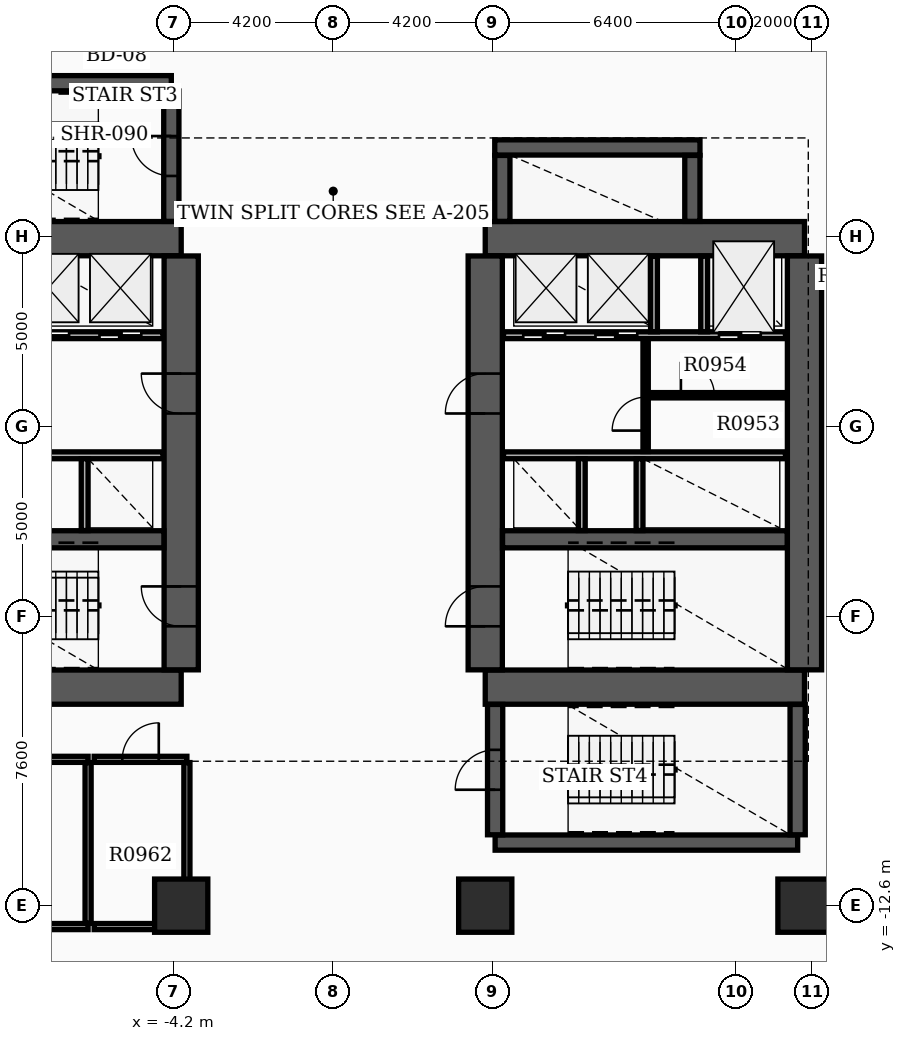
"""IFC4 building model, lengths in metres.
Left out: names, types, materials, properties, quantities, classifications, styles, units other than length and angle.
Written with IfcOpenShell. Run it as: python <this file> out.ifc"""

import sys

from ifc_helpers import new_model, si_unit, direction, frame, frame_2d, origin, origin_2d, place, context, subcontext, project, spatial, rectangle, extrude, element, fill, save


model = new_model("IFC4")
c1 = context("Model", 3, precision=1e-05, world=origin(), true_north=direction((0.0, 1.0)))
c2 = subcontext(c1, "Body", "Model", "MODEL_VIEW")
j1 = project(units=[si_unit("LENGTHUNIT", "METRE"), si_unit("PLANEANGLEUNIT", "RADIAN")], contexts=[c1])
p1 = place(None, origin())
s1 = spatial("IfcSite", under=j1, at=p1, CompositionType="ELEMENT")
p2 = place(p1, origin())
s2 = spatial("IfcBuilding", under=s1, at=p2, CompositionType="ELEMENT")
p3 = place(p2, frame((0.0, 0.0, 63.9)))
s3 = spatial("IfcBuildingStorey", under=s2, at=p3, CompositionType="ELEMENT", Elevation=63.9)
for number, where, z_axis, x_axis in (
    (1, (-12.4, -6.85, 0.0), (0.0, 0.0, 1.0), (1.0, 0.0, 0.0)),
    (2, (-12.4, 4.95, 0.0), (0.0, 0.0, 1.0), (1.0, 0.0, 0.0)),
):
    element("IfcWall", number, at=place(p3, frame(where, z_axis=z_axis, x_axis=x_axis)), inside=s3, PredefinedType="SHEAR", context=c2, shape_type="SweptSolid", body=[
        extrude(rectangle(XDim=8.4, YDim=0.9, at=frame_2d((4.2, 0.0))), origin(), (0.0, 0.0, 1.0), 3.7),
    ])
p4 = place(p3, frame((-4.0, -6.395, 0.0), z_axis=(0.0, 0.0, 1.0), x_axis=(0.0, 1.0, 0.0)))
e3 = element("IfcWall", 3, at=p4, inside=s3, PredefinedType="SHEAR", context=c2, shape_type="SweptSolid", body=[
    extrude(rectangle(XDim=10.89, YDim=0.9, at=frame_2d((5.445, 0.0))), origin(), (0.0, 0.0, 1.0), 3.7),
])
p5 = place(p4, frame((1.145, 0.0, 0.0)))
e4 = element("IfcOpeningElement", 4, at=p5, cuts=e3, PredefinedType="OPENING", context=c2, shape_type="SweptSolid", body=[
    extrude(rectangle(XDim=1.05, YDim=2.15, at=frame_2d((0.525, 1.075))), frame((0.0, 0.46, 0.0), z_axis=(0.0, -1.0, 0.0), x_axis=(1.0, 0.0, 0.0)), (0.0, 0.0, 1.0), 0.92),
])
p6 = place(p4, frame((6.745, 0.0, 0.0)))
e5 = element("IfcOpeningElement", 5, at=p6, cuts=e3, PredefinedType="OPENING", context=c2, shape_type="SweptSolid", body=[
    extrude(rectangle(XDim=1.05, YDim=2.15, at=frame_2d((0.525, 1.075))), frame((0.0, 0.46, 0.0), z_axis=(0.0, -1.0, 0.0), x_axis=(1.0, 0.0, 0.0)), (0.0, 0.0, 1.0), 0.92),
])
p7 = place(p3, frame((-11.945, -2.96, 0.0), z_axis=(0.0, 0.0, 1.0), x_axis=(1.0, 0.0, 0.0)))
e6 = element("IfcWall", 6, at=p7, inside=s3, PredefinedType="SHEAR", context=c2, shape_type="SweptSolid", body=[
    extrude(rectangle(XDim=7.49, YDim=0.45, at=frame_2d((3.745, 0.0))), origin(), (0.0, 0.0, 1.0), 3.7),
])
for number, where, z_axis, x_axis in (
    (7, (4.0, -6.85, 0.0), (0.0, 0.0, 1.0), (1.0, 0.0, 0.0)),
    (8, (4.0, 4.95, 0.0), (0.0, 0.0, 1.0), (1.0, 0.0, 0.0)),
):
    element("IfcWall", number, at=place(p3, frame(where, z_axis=z_axis, x_axis=x_axis)), inside=s3, PredefinedType="SHEAR", context=c2, shape_type="SweptSolid", body=[
        extrude(rectangle(XDim=8.4, YDim=0.9, at=frame_2d((4.2, 0.0))), origin(), (0.0, 0.0, 1.0), 3.7),
    ])
p8 = place(p3, frame((4.0, -6.395, 0.0), z_axis=(0.0, 0.0, 1.0), x_axis=(0.0, 1.0, 0.0)))
e9 = element("IfcWall", 9, at=p8, inside=s3, PredefinedType="SHEAR", context=c2, shape_type="SweptSolid", body=[
    extrude(rectangle(XDim=10.89, YDim=0.9, at=frame_2d((5.445, 0.0))), origin(), (0.0, 0.0, 1.0), 3.7),
])
p9 = place(p8, frame((1.145, 0.0, 0.0)))
e10 = element("IfcOpeningElement", 10, at=p9, cuts=e9, PredefinedType="OPENING", context=c2, shape_type="SweptSolid", body=[
    extrude(rectangle(XDim=1.05, YDim=2.15, at=frame_2d((0.525, 1.075))), frame((0.0, 0.46, 0.0), z_axis=(0.0, -1.0, 0.0), x_axis=(1.0, 0.0, 0.0)), (0.0, 0.0, 1.0), 0.92),
])
p10 = place(p8, frame((6.745, 0.0, 0.0)))
e11 = element("IfcOpeningElement", 11, at=p10, cuts=e9, PredefinedType="OPENING", context=c2, shape_type="SweptSolid", body=[
    extrude(rectangle(XDim=1.05, YDim=2.15, at=frame_2d((0.525, 1.075))), frame((0.0, 0.46, 0.0), z_axis=(0.0, -1.0, 0.0), x_axis=(1.0, 0.0, 0.0)), (0.0, 0.0, 1.0), 0.92),
])
p11 = place(p3, frame((12.4, -6.395, 0.0), z_axis=(0.0, 0.0, 1.0), x_axis=(0.0, 1.0, 0.0)))
e12 = element("IfcWall", 12, at=p11, inside=s3, PredefinedType="SHEAR", context=c2, shape_type="SweptSolid", body=[
    extrude(rectangle(XDim=10.89, YDim=0.9, at=frame_2d((5.445, 0.0))), origin(), (0.0, 0.0, 1.0), 3.7),
])
p12 = place(p3, frame((4.455, -2.96, 0.0), z_axis=(0.0, 0.0, 1.0), x_axis=(1.0, 0.0, 0.0)))
e13 = element("IfcWall", 13, at=p12, inside=s3, PredefinedType="SHEAR", context=c2, shape_type="SweptSolid", body=[
    extrude(rectangle(XDim=7.49, YDim=0.45, at=frame_2d((3.745, 0.0))), origin(), (0.0, 0.0, 1.0), 3.7),
])
p13 = place(p3, frame((-12.22, 9.04, 0.0), z_axis=(0.0, 0.0, 1.0), x_axis=(1.0, 0.0, 0.0)))
e14 = element("IfcWall", 14, at=p13, inside=s3, PredefinedType="SHEAR", context=c2, shape_type="SweptSolid", body=[
    extrude(rectangle(XDim=7.96, YDim=0.4, at=frame_2d((3.98, 0.0))), origin(), (0.0, 0.0, 1.0), 3.7),
])
p14 = place(p3, frame((-4.26, 5.405, 0.0), z_axis=(0.0, 0.0, 1.0), x_axis=(0.0, 1.0, 0.0)))
e15 = element("IfcWall", 15, at=p14, inside=s3, PredefinedType="SHEAR", context=c2, shape_type="SweptSolid", body=[
    extrude(rectangle(XDim=3.43, YDim=0.4, at=frame_2d((1.715, 0.0))), origin(), (0.0, 0.0, 1.0), 3.7),
])
p15 = place(p14, frame((1.195, 0.0, 0.0)))
e16 = element("IfcOpeningElement", 16, at=p15, cuts=e15, PredefinedType="OPENING", context=c2, shape_type="SweptSolid", body=[
    extrude(rectangle(XDim=1.05, YDim=2.15, at=frame_2d((0.525, 1.075))), frame((0.0, 0.21, 0.0), z_axis=(0.0, -1.0, 0.0), x_axis=(1.0, 0.0, 0.0)), (0.0, 0.0, 1.0), 0.42),
])
p16 = place(p3, frame((4.26, -10.94, 0.0), z_axis=(0.0, 0.0, 1.0), x_axis=(1.0, 0.0, 0.0)))
e17 = element("IfcWall", 17, at=p16, inside=s3, PredefinedType="SHEAR", context=c2, shape_type="SweptSolid", body=[
    extrude(rectangle(XDim=7.96, YDim=0.4, at=frame_2d((3.98, 0.0))), origin(), (0.0, 0.0, 1.0), 3.7),
])
p17 = place(p3, frame((4.26, -10.735, 0.0), z_axis=(0.0, 0.0, 1.0), x_axis=(0.0, 1.0, 0.0)))
e18 = element("IfcWall", 18, at=p17, inside=s3, PredefinedType="SHEAR", context=c2, shape_type="SweptSolid", body=[
    extrude(rectangle(XDim=3.43, YDim=0.4, at=frame_2d((1.715, 0.0))), origin(), (0.0, 0.0, 1.0), 3.7),
])
p18 = place(p17, frame((1.185, 0.0, 0.0)))
e19 = element("IfcOpeningElement", 19, at=p18, cuts=e18, PredefinedType="OPENING", context=c2, shape_type="SweptSolid", body=[
    extrude(rectangle(XDim=1.05, YDim=2.15, at=frame_2d((0.525, 1.075))), frame((0.0, 0.21, 0.0), z_axis=(0.0, -1.0, 0.0), x_axis=(1.0, 0.0, 0.0)), (0.0, 0.0, 1.0), 0.42),
])
p19 = place(p3, frame((12.22, -10.735, 0.0), z_axis=(0.0, 0.0, 1.0), x_axis=(0.0, 1.0, 0.0)))
e20 = element("IfcWall", 20, at=p19, inside=s3, PredefinedType="SHEAR", context=c2, shape_type="SweptSolid", body=[
    extrude(rectangle(XDim=3.43, YDim=0.4, at=frame_2d((1.715, 0.0))), origin(), (0.0, 0.0, 1.0), 3.7),
])
p20 = place(p3, frame((4.45, 5.405, 0.0), z_axis=(0.0, 0.0, 1.0), x_axis=(0.0, 1.0, 0.0)))
e21 = element("IfcWall", 21, at=p20, inside=s3, PredefinedType="SHEAR", context=c2, shape_type="SweptSolid", body=[
    extrude(rectangle(XDim=1.735, YDim=0.4, at=frame_2d((0.867, 0.0))), origin(), (0.0, 0.0, 1.0), 3.7),
])
p21 = place(p3, frame((4.25, 7.35, 0.0), z_axis=(0.0, 0.0, 1.0), x_axis=(1.0, 0.0, 0.0)))
e22 = element("IfcWall", 22, at=p21, inside=s3, PredefinedType="SHEAR", context=c2, shape_type="SweptSolid", body=[
    extrude(rectangle(XDim=5.4, YDim=0.4, at=frame_2d((2.7, 0.0))), origin(), (0.0, 0.0, 1.0), 3.7),
])
p22 = place(p3, frame((9.45, 5.405, 0.0), z_axis=(0.0, 0.0, 1.0), x_axis=(0.0, 1.0, 0.0)))
e23 = element("IfcWall", 23, at=p22, inside=s3, PredefinedType="SHEAR", context=c2, shape_type="SweptSolid", body=[
    extrude(rectangle(XDim=1.735, YDim=0.4, at=frame_2d((0.867, 0.0))), origin(), (0.0, 0.0, 1.0), 3.7),
])
for number, where, z_axis, x_axis in (
    (24, (12.4, -12.6, 0.0), (0.0, 0.0, 1.0), (1.0, 0.0, 0.0)),
    (25, (-4.0, -12.6, 0.0), (0.0, 0.0, 1.0), (1.0, 0.0, 0.0)),
    (26, (4.0, -12.6, 0.0), (0.0, 0.0, 1.0), (1.0, 0.0, 0.0)),
):
    element("IfcColumn", number, at=place(p3, frame(where, z_axis=z_axis, x_axis=x_axis)), inside=s3, PredefinedType="COLUMN", context=c2, shape_type="SweptSolid", body=[
        extrude(rectangle(XDim=1.4, YDim=1.4, at=origin_2d()), origin(), (0.0, 0.0, 1.0), 3.9),
    ])
p23 = place(p3, frame((-11.9, 2.41, 0.0), z_axis=(0.0, 0.0, 1.0), x_axis=(1.0, 0.0, 0.0)))
e27 = element("IfcWall", 27, at=p23, inside=s3, PredefinedType="SOLIDWALL", context=c2, shape_type="SweptSolid", body=[
    extrude(rectangle(XDim=7.42, YDim=0.18, at=frame_2d((3.71, 0.0))), origin(), (0.0, 0.0, 1.0), 2.9),
])
p24 = place(p23, frame((0.55, 0.0, 0.0)))
e28 = element("IfcOpeningElement", 28, at=p24, cuts=e27, PredefinedType="OPENING", context=c2, shape_type="SweptSolid", body=[
    extrude(rectangle(XDim=1.1, YDim=2.15, at=frame_2d((0.55, 1.075))), frame((0.0, 0.1, 0.0), z_axis=(0.0, -1.0, 0.0), x_axis=(1.0, 0.0, 0.0)), (0.0, 0.0, 1.0), 0.2),
])
p25 = place(p23, frame((3.85, 0.0, 0.0)))
e29 = element("IfcOpeningElement", 29, at=p25, cuts=e27, PredefinedType="OPENING", context=c2, shape_type="SweptSolid", body=[
    extrude(rectangle(XDim=1.1, YDim=2.15, at=frame_2d((0.55, 1.075))), frame((0.0, 0.1, 0.0), z_axis=(0.0, -1.0, 0.0), x_axis=(1.0, 0.0, 0.0)), (0.0, 0.0, 1.0), 0.2),
])
p26 = place(p23, frame((5.75, 0.0, 0.0)))
e30 = element("IfcOpeningElement", 30, at=p26, cuts=e27, PredefinedType="OPENING", context=c2, shape_type="SweptSolid", body=[
    extrude(rectangle(XDim=1.1, YDim=2.15, at=frame_2d((0.55, 1.075))), frame((0.0, 0.1, 0.0), z_axis=(0.0, -1.0, 0.0), x_axis=(1.0, 0.0, 0.0)), (0.0, 0.0, 1.0), 0.2),
])
p27 = place(p3, frame((4.48, 2.41, 0.0), z_axis=(0.0, 0.0, 1.0), x_axis=(1.0, 0.0, 0.0)))
e31 = element("IfcWall", 31, at=p27, inside=s3, PredefinedType="SOLIDWALL", context=c2, shape_type="SweptSolid", body=[
    extrude(rectangle(XDim=7.42, YDim=0.18, at=frame_2d((3.71, 0.0))), origin(), (0.0, 0.0, 1.0), 2.9),
])
p28 = place(p27, frame((5.67, 0.0, 0.0)))
e32 = element("IfcOpeningElement", 32, at=p28, cuts=e31, PredefinedType="OPENING", context=c2, shape_type="SweptSolid", body=[
    extrude(rectangle(XDim=1.1, YDim=2.15, at=frame_2d((0.55, 1.075))), frame((0.0, 0.1, 0.0), z_axis=(0.0, -1.0, 0.0), x_axis=(1.0, 0.0, 0.0)), (0.0, 0.0, 1.0), 0.2),
])
p29 = place(p27, frame((0.52, 0.0, 0.0)))
e33 = element("IfcOpeningElement", 33, at=p29, cuts=e31, PredefinedType="OPENING", context=c2, shape_type="SweptSolid", body=[
    extrude(rectangle(XDim=1.1, YDim=2.15, at=frame_2d((0.55, 1.075))), frame((0.0, 0.1, 0.0), z_axis=(0.0, -1.0, 0.0), x_axis=(1.0, 0.0, 0.0)), (0.0, 0.0, 1.0), 0.2),
])
p30 = place(p27, frame((2.42, 0.0, 0.0)))
e34 = element("IfcOpeningElement", 34, at=p30, cuts=e31, PredefinedType="OPENING", context=c2, shape_type="SweptSolid", body=[
    extrude(rectangle(XDim=1.1, YDim=2.15, at=frame_2d((0.55, 1.075))), frame((0.0, 0.1, 0.0), z_axis=(0.0, -1.0, 0.0), x_axis=(1.0, 0.0, 0.0)), (0.0, 0.0, 1.0), 0.2),
])
for number, where, z_axis, x_axis in (
    (35, (-11.9, -0.75, 0.0), (0.0, 0.0, 1.0), (1.0, 0.0, 0.0)),
    (36, (4.48, -0.75, 0.0), (0.0, 0.0, 1.0), (1.0, 0.0, 0.0)),
):
    element("IfcWall", number, at=place(p3, frame(where, z_axis=z_axis, x_axis=x_axis)), inside=s3, PredefinedType="SOLIDWALL", context=c2, shape_type="SweptSolid", body=[
        extrude(rectangle(XDim=7.42, YDim=0.18, at=frame_2d((3.71, 0.0))), origin(), (0.0, 0.0, 1.0), 2.9),
    ])
for number, where, z_axis, x_axis in (
    (37, (8.44, 2.5, 0.0), (0.0, 0.0, 1.0), (0.0, 1.0, 0.0)),
    (38, (9.76, 2.5, 0.0), (0.0, 0.0, 1.0), (0.0, 1.0, 0.0)),
):
    element("IfcWall", number, at=place(p3, frame(where, z_axis=z_axis, x_axis=x_axis)), inside=s3, PredefinedType="SOLIDWALL", context=c2, shape_type="SweptSolid", body=[
        extrude(rectangle(XDim=1.99, YDim=0.18, at=frame_2d((0.995, 0.0))), origin(), (0.0, 0.0, 1.0), 2.9),
    ])
for number, where, z_axis, x_axis in (
    (39, (-6.54, -2.73, 0.0), (0.0, 0.0, 1.0), (0.0, 1.0, 0.0)),
    (40, (6.54, -2.73, 0.0), (0.0, 0.0, 1.0), (0.0, 1.0, 0.0)),
    (41, (8.06, -2.73, 0.0), (0.0, 0.0, 1.0), (0.0, 1.0, 0.0)),
):
    element("IfcWall", number, at=place(p3, frame(where, z_axis=z_axis, x_axis=x_axis)), inside=s3, PredefinedType="SOLIDWALL", context=c2, shape_type="SweptSolid", body=[
        extrude(rectangle(XDim=1.89, YDim=0.18, at=frame_2d((0.945, 0.0))), origin(), (0.0, 0.0, 1.0), 2.9),
    ])
p31 = place(p3, frame((8.22, -0.65, 0.0), z_axis=(0.0, 0.0, 1.0), x_axis=(0.0, 1.0, 0.0)))
e42 = element("IfcWall", 42, at=p31, inside=s3, PredefinedType="SOLIDWALL", context=c2, shape_type="SweptSolid", body=[
    extrude(rectangle(XDim=2.96, YDim=0.14, at=frame_2d((1.48, 0.0))), origin(), (0.0, 0.0, 1.0), 2.9),
])
p32 = place(p31, frame((0.55, 0.0, 0.0)))
e43 = element("IfcOpeningElement", 43, at=p32, cuts=e42, PredefinedType="OPENING", context=c2, shape_type="SweptSolid", body=[
    extrude(rectangle(XDim=0.88, YDim=2.1, at=frame_2d((0.44, 1.05))), frame((0.0, 0.08, 0.0), z_axis=(0.0, -1.0, 0.0), x_axis=(1.0, 0.0, 0.0)), (0.0, 0.0, 1.0), 0.16),
])
p33 = place(p3, frame((8.298, 0.83, 0.0), z_axis=(0.0, 0.0, 1.0), x_axis=(1.0, 0.0, 0.0)))
e44 = element("IfcWall", 44, at=p33, inside=s3, PredefinedType="PARTITIONING", context=c2, shape_type="SweptSolid", body=[
    extrude(rectangle(XDim=3.552, YDim=0.14, at=frame_2d((1.776, 0.0))), origin(), (0.0, 0.0, 1.0), 2.9),
])
p34 = place(p33, frame((0.85, 0.0, 0.0)))
e45 = element("IfcOpeningElement", 45, at=p34, cuts=e44, PredefinedType="OPENING", context=c2, shape_type="SweptSolid", body=[
    extrude(rectangle(XDim=0.88, YDim=2.1, at=frame_2d((0.44, 1.05))), frame((0.0, 0.08, 0.0), z_axis=(0.0, -1.0, 0.0), x_axis=(1.0, 0.0, 0.0)), (0.0, 0.0, 1.0), 0.16),
])
p35 = place(p3, frame((-12.4, -13.15, 0.0), z_axis=(0.0, 0.0, 1.0), x_axis=(1.0, 0.0, 0.0)))
e46 = element("IfcWall", 46, at=p35, inside=s3, PredefinedType="PARTITIONING", context=c2, shape_type="SweptSolid", body=[
    extrude(rectangle(XDim=5.95, YDim=0.16, at=frame_2d((2.975, 0.0))), origin(), (0.0, 0.0, 1.0), 2.9),
])
p36 = place(p3, frame((-12.4, -8.75, 0.0), z_axis=(0.0, 0.0, 1.0), x_axis=(1.0, 0.0, 0.0)))
e47 = element("IfcWall", 47, at=p36, inside=s3, PredefinedType="PARTITIONING", context=c2, shape_type="SweptSolid", body=[
    extrude(rectangle(XDim=5.95, YDim=0.16, at=frame_2d((2.975, 0.0))), origin(), (0.0, 0.0, 1.0), 2.9),
])
p37 = place(p36, frame((2.495, 0.0, 0.0)))
e48 = element("IfcOpeningElement", 48, at=p37, cuts=e47, PredefinedType="OPENING", context=c2, shape_type="SweptSolid", body=[
    extrude(rectangle(XDim=0.96, YDim=2.15, at=frame_2d((0.48, 1.075))), frame((0.0, 0.09, 0.0), z_axis=(0.0, -1.0, 0.0), x_axis=(1.0, 0.0, 0.0)), (0.0, 0.0, 1.0), 0.18),
])
p38 = place(p3, frame((-6.45, -13.065, 0.0), z_axis=(0.0, 0.0, 1.0), x_axis=(0.0, 1.0, 0.0)))
e49 = element("IfcWall", 49, at=p38, inside=s3, PredefinedType="PARTITIONING", context=c2, shape_type="SweptSolid", body=[
    extrude(rectangle(XDim=4.23, YDim=0.16, at=frame_2d((2.115, 0.0))), origin(), (0.0, 0.0, 1.0), 2.9),
])
p39 = place(p3, frame((-6.29, -13.15, 0.0), z_axis=(0.0, 0.0, 1.0), x_axis=(1.0, 0.0, 0.0)))
e50 = element("IfcWall", 50, at=p39, inside=s3, PredefinedType="PARTITIONING", context=c2, shape_type="SweptSolid", body=[
    extrude(rectangle(XDim=2.44, YDim=0.16, at=frame_2d((1.22, 0.0))), origin(), (0.0, 0.0, 1.0), 2.9),
])
p40 = place(p3, frame((-6.29, -8.75, 0.0), z_axis=(0.0, 0.0, 1.0), x_axis=(1.0, 0.0, 0.0)))
e51 = element("IfcWall", 51, at=p40, inside=s3, PredefinedType="PARTITIONING", context=c2, shape_type="SweptSolid", body=[
    extrude(rectangle(XDim=2.44, YDim=0.16, at=frame_2d((1.22, 0.0))), origin(), (0.0, 0.0, 1.0), 2.9),
])
p41 = place(p40, frame((0.74, 0.0, 0.0)))
e52 = element("IfcOpeningElement", 52, at=p41, cuts=e51, PredefinedType="OPENING", context=c2, shape_type="SweptSolid", body=[
    extrude(rectangle(XDim=0.96, YDim=2.15, at=frame_2d((0.48, 1.075))), frame((0.0, 0.09, 0.0), z_axis=(0.0, -1.0, 0.0), x_axis=(1.0, 0.0, 0.0)), (0.0, 0.0, 1.0), 0.18),
])
p42 = place(p3, frame((-3.85, -13.065, 0.0), z_axis=(0.0, 0.0, 1.0), x_axis=(0.0, 1.0, 0.0)))
e53 = element("IfcWall", 53, at=p42, inside=s3, PredefinedType="PARTITIONING", context=c2, shape_type="SweptSolid", body=[
    extrude(rectangle(XDim=4.23, YDim=0.16, at=frame_2d((2.115, 0.0))), origin(), (0.0, 0.0, 1.0), 2.9),
])
p43 = place(p5, origin())
e54 = element("IfcDoor", 54, at=p43, inside=s3, OperationType="SINGLE_SWING_RIGHT", PredefinedType="DOOR", context=c2, shape_type="SweptSolid", body=[
    extrude(rectangle(XDim=1.05, YDim=2.15, at=frame_2d((0.525, 1.075))), frame((0.0, 0.025, 0.0), z_axis=(0.0, -1.0, 0.0), x_axis=(1.0, 0.0, 0.0)), (0.0, 0.0, 1.0), 0.05),
])
fill(e4, e54)
p44 = place(p9, origin())
e55 = element("IfcDoor", 55, at=p44, inside=s3, OperationType="SINGLE_SWING_LEFT", PredefinedType="DOOR", context=c2, shape_type="SweptSolid", body=[
    extrude(rectangle(XDim=1.05, YDim=2.15, at=frame_2d((0.525, 1.075))), frame((0.0, 0.025, 0.0), z_axis=(0.0, -1.0, 0.0), x_axis=(1.0, 0.0, 0.0)), (0.0, 0.0, 1.0), 0.05),
])
fill(e10, e55)
p45 = place(p6, origin())
e56 = element("IfcDoor", 56, at=p45, inside=s3, OperationType="SINGLE_SWING_RIGHT", PredefinedType="DOOR", context=c2, shape_type="SweptSolid", body=[
    extrude(rectangle(XDim=1.05, YDim=2.15, at=frame_2d((0.525, 1.075))), frame((0.0, 0.025, 0.0), z_axis=(0.0, -1.0, 0.0), x_axis=(1.0, 0.0, 0.0)), (0.0, 0.0, 1.0), 0.05),
])
fill(e5, e56)
p46 = place(p10, origin())
e57 = element("IfcDoor", 57, at=p46, inside=s3, OperationType="SINGLE_SWING_LEFT", PredefinedType="DOOR", context=c2, shape_type="SweptSolid", body=[
    extrude(rectangle(XDim=1.05, YDim=2.15, at=frame_2d((0.525, 1.075))), frame((0.0, 0.025, 0.0), z_axis=(0.0, -1.0, 0.0), x_axis=(1.0, 0.0, 0.0)), (0.0, 0.0, 1.0), 0.05),
])
fill(e11, e57)
p47 = place(p15, origin())
e58 = element("IfcDoor", 58, at=p47, inside=s3, OperationType="SINGLE_SWING_RIGHT", PredefinedType="DOOR", context=c2, shape_type="SweptSolid", body=[
    extrude(rectangle(XDim=1.05, YDim=2.15, at=frame_2d((0.525, 1.075))), frame((0.0, 0.025, 0.0), z_axis=(0.0, -1.0, 0.0), x_axis=(1.0, 0.0, 0.0)), (0.0, 0.0, 1.0), 0.05),
])
fill(e16, e58)
p48 = place(p18, origin())
e59 = element("IfcDoor", 59, at=p48, inside=s3, OperationType="SINGLE_SWING_LEFT", PredefinedType="DOOR", context=c2, shape_type="SweptSolid", body=[
    extrude(rectangle(XDim=1.05, YDim=2.15, at=frame_2d((0.525, 1.075))), frame((0.0, 0.025, 0.0), z_axis=(0.0, -1.0, 0.0), x_axis=(1.0, 0.0, 0.0)), (0.0, 0.0, 1.0), 0.05),
])
fill(e19, e59)
p49 = place(p28, origin())
e60 = element("IfcDoor", 60, at=p49, inside=s3, OperationType="DOUBLE_DOOR_SLIDING", PredefinedType="DOOR", context=c2, shape_type="SweptSolid", body=[
    extrude(rectangle(XDim=1.1, YDim=2.15, at=frame_2d((0.55, 1.075))), frame((0.0, 0.025, 0.0), z_axis=(0.0, -1.0, 0.0), x_axis=(1.0, 0.0, 0.0)), (0.0, 0.0, 1.0), 0.05),
])
fill(e32, e60)
p50 = place(p25, origin())
e61 = element("IfcDoor", 61, at=p50, inside=s3, OperationType="DOUBLE_DOOR_SLIDING", PredefinedType="DOOR", context=c2, shape_type="SweptSolid", body=[
    extrude(rectangle(XDim=1.1, YDim=2.15, at=frame_2d((0.55, 1.075))), frame((0.0, 0.025, 0.0), z_axis=(0.0, -1.0, 0.0), x_axis=(1.0, 0.0, 0.0)), (0.0, 0.0, 1.0), 0.05),
])
fill(e29, e61)
p51 = place(p26, origin())
e62 = element("IfcDoor", 62, at=p51, inside=s3, OperationType="DOUBLE_DOOR_SLIDING", PredefinedType="DOOR", context=c2, shape_type="SweptSolid", body=[
    extrude(rectangle(XDim=1.1, YDim=2.15, at=frame_2d((0.55, 1.075))), frame((0.0, 0.025, 0.0), z_axis=(0.0, -1.0, 0.0), x_axis=(1.0, 0.0, 0.0)), (0.0, 0.0, 1.0), 0.05),
])
fill(e30, e62)
p52 = place(p29, origin())
e63 = element("IfcDoor", 63, at=p52, inside=s3, OperationType="DOUBLE_DOOR_SLIDING", PredefinedType="DOOR", context=c2, shape_type="SweptSolid", body=[
    extrude(rectangle(XDim=1.1, YDim=2.15, at=frame_2d((0.55, 1.075))), frame((0.0, 0.025, 0.0), z_axis=(0.0, -1.0, 0.0), x_axis=(1.0, 0.0, 0.0)), (0.0, 0.0, 1.0), 0.05),
])
fill(e33, e63)
p53 = place(p30, origin())
e64 = element("IfcDoor", 64, at=p53, inside=s3, OperationType="DOUBLE_DOOR_SLIDING", PredefinedType="DOOR", context=c2, shape_type="SweptSolid", body=[
    extrude(rectangle(XDim=1.1, YDim=2.15, at=frame_2d((0.55, 1.075))), frame((0.0, 0.025, 0.0), z_axis=(0.0, -1.0, 0.0), x_axis=(1.0, 0.0, 0.0)), (0.0, 0.0, 1.0), 0.05),
])
fill(e34, e64)
p54 = place(p32, origin())
e65 = element("IfcDoor", 65, at=p54, inside=s3, OperationType="SINGLE_SWING_LEFT", PredefinedType="DOOR", context=c2, shape_type="SweptSolid", body=[
    extrude(rectangle(XDim=0.88, YDim=2.1, at=frame_2d((0.44, 1.05))), frame((0.0, 0.025, 0.0), z_axis=(0.0, -1.0, 0.0), x_axis=(1.0, 0.0, 0.0)), (0.0, 0.0, 1.0), 0.05),
])
fill(e43, e65)
p55 = place(p34, origin())
e66 = element("IfcDoor", 66, at=p55, inside=s3, OperationType="SINGLE_SWING_LEFT", PredefinedType="DOOR", context=c2, shape_type="SweptSolid", body=[
    extrude(rectangle(XDim=0.88, YDim=2.1, at=frame_2d((0.44, 1.05))), frame((0.0, 0.025, 0.0), z_axis=(0.0, -1.0, 0.0), x_axis=(1.0, 0.0, 0.0)), (0.0, 0.0, 1.0), 0.05),
])
fill(e45, e66)
p56 = place(p41, origin())
e67 = element("IfcDoor", 67, at=p56, inside=s3, OperationType="SINGLE_SWING_RIGHT", PredefinedType="DOOR", context=c2, shape_type="SweptSolid", body=[
    extrude(rectangle(XDim=0.96, YDim=2.15, at=frame_2d((0.48, 1.075))), frame((0.0, 0.025, 0.0), z_axis=(0.0, -1.0, 0.0), x_axis=(1.0, 0.0, 0.0)), (0.0, 0.0, 1.0), 0.05),
])
fill(e52, e67)
save(model, sys.argv[1])
